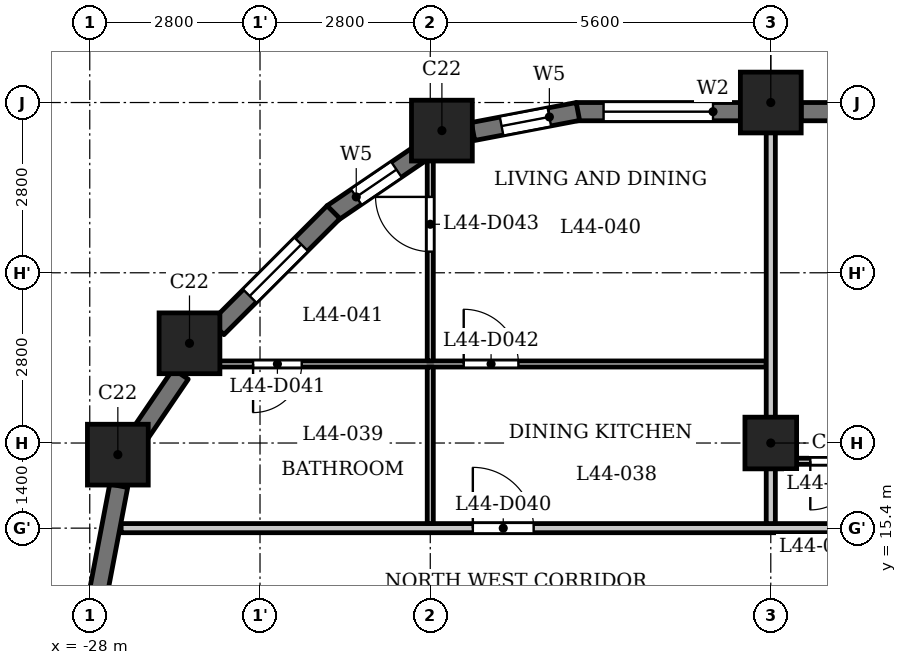
"""IFC4 building model, lengths in metres.
Left out: names, types, materials, properties, quantities, classifications, styles, units other than length and angle.
Written with IfcOpenShell. Run it as: python <this file> out.ifc"""

import sys

from ifc_helpers import new_model, si_unit, direction, frame, frame_2d, origin, origin_2d, place, context, subcontext, project, spatial, rectangle, extrude, element, fill, save


model = new_model("IFC4")
c1 = context("Model", 3, precision=1e-05, world=origin(), true_north=direction((0.0, 1.0)))
c2 = subcontext(c1, "Body", "Model", "MODEL_VIEW")
j1 = project(units=[si_unit("LENGTHUNIT", "METRE"), si_unit("PLANEANGLEUNIT", "RADIAN")], contexts=[c1])
p1 = place(None, origin())
s1 = spatial("IfcSite", under=j1, at=p1, CompositionType="ELEMENT")
p2 = place(p1, origin())
s2 = spatial("IfcBuilding", under=s1, at=p2, CompositionType="ELEMENT")
p3 = place(p2, frame((0.0, 0.0, 171.1)))
s3 = spatial("IfcBuildingStorey", under=s2, at=p3, CompositionType="ELEMENT", Elevation=171.1)
for number, where, z_axis, x_axis in (
    (1, (-16.8, 22.4, 0.0), (0.0, 0.0, 1.0), (1.0, 0.0, 0.0)),
    (2, (-22.209, 21.938, 0.0), (0.0, 0.0, 1.0), (1.0, 0.0, 0.0)),
    (3, (-26.36, 18.44, 0.0), (0.0, 0.0, 1.0), (1.0, 0.0, 0.0)),
    (4, (-27.538, 16.609, 0.0), (0.0, 0.0, 1.0), (1.0, 0.0, 0.0)),
):
    element("IfcColumn", number, at=place(p3, frame(where, z_axis=z_axis, x_axis=x_axis)), inside=s3, PredefinedType="COLUMN", context=c2, shape_type="SweptSolid", body=[
        extrude(rectangle(XDim=1.0, YDim=1.0, at=origin_2d()), origin(), (0.0, 0.0, 1.0), 3.5),
    ])
p4 = place(p3, frame((-16.8, 16.8, 0.0), z_axis=(0.0, 0.0, 1.0), x_axis=(1.0, 0.0, 0.0)))
e5 = element("IfcColumn", 5, at=p4, inside=s3, PredefinedType="COLUMN", context=c2, shape_type="SweptSolid", body=[
    extrude(rectangle(XDim=0.85, YDim=0.85, at=origin_2d()), origin(), (0.0, 0.0, 1.0), 3.5),
])
p5 = place(p3, frame((-11.7, 22.25, 0.0), z_axis=(0.0, 0.0, 1.0), x_axis=(-1.0, 0.0, 0.0)))
e6 = element("IfcWall", 6, at=p5, inside=s3, PredefinedType="SOLIDWALL", context=c2, shape_type="SweptSolid", body=[
    extrude(rectangle(XDim=4.6, YDim=0.3, at=frame_2d((2.3, 0.0))), origin(), (0.0, 0.0, 1.0), 2.45),
])
p6 = place(p5, frame((0.5, 0.0, 1.2)))
e7 = element("IfcOpeningElement", 7, at=p6, cuts=e6, PredefinedType="OPENING", context=c2, shape_type="SweptSolid", body=[
    extrude(rectangle(XDim=3.6, YDim=0.95, at=frame_2d((1.8, 0.475))), frame((0.0, 0.16, 0.0), z_axis=(0.0, -1.0, 0.0), x_axis=(1.0, 0.0, 0.0)), (0.0, 0.0, 1.0), 0.32),
])
p7 = place(p3, frame((-17.3, 22.25, 0.0), z_axis=(0.0, 0.0, 1.0), x_axis=(-1.0, 0.0, 0.0)))
e8 = element("IfcWall", 8, at=p7, inside=s3, PredefinedType="SOLIDWALL", context=c2, shape_type="SweptSolid", body=[
    extrude(rectangle(XDim=2.7, YDim=0.3, at=frame_2d((1.35, 0.0))), origin(), (0.0, 0.0, 1.0), 2.45),
])
p8 = place(p7, frame((0.45, 0.0, 0.9)))
e9 = element("IfcOpeningElement", 9, at=p8, cuts=e8, PredefinedType="OPENING", context=c2, shape_type="SweptSolid", body=[
    extrude(rectangle(XDim=1.8, YDim=1.25, at=frame_2d((0.9, 0.625))), frame((0.0, 0.16, 0.0), z_axis=(0.0, -1.0, 0.0), x_axis=(1.0, 0.0, 0.0)), (0.0, 0.0, 1.0), 0.32),
])
p9 = place(p3, frame((-19.972, 22.253, 0.0), z_axis=(0.0, 0.0, 1.0), x_axis=(-0.982284988433, -0.187393173565, 0.0)))
e10 = element("IfcWall", 10, at=p9, inside=s3, PredefinedType="SOLIDWALL", context=c2, shape_type="SweptSolid", body=[
    extrude(rectangle(XDim=1.756, YDim=0.3, at=frame_2d((0.878, 0.0))), origin(), (0.0, 0.0, 1.0), 2.45),
])
p10 = place(p9, frame((0.478, 0.0, 0.6)))
e11 = element("IfcOpeningElement", 11, at=p10, cuts=e10, PredefinedType="OPENING", context=c2, shape_type="SweptSolid", body=[
    extrude(rectangle(XDim=0.8, YDim=1.55, at=frame_2d((0.4, 0.775))), frame((0.0, 0.16, 0.0), z_axis=(0.0, -1.0, 0.0), x_axis=(1.0, 0.0, 0.0)), (0.0, 0.0, 1.0), 0.32),
])
p11 = place(p3, frame((-22.56, 21.566, 0.0), z_axis=(0.0, 0.0, 1.0), x_axis=(-0.82707645233, -0.562089443061, 0.0)))
e12 = element("IfcWall", 12, at=p11, inside=s3, PredefinedType="SOLIDWALL", context=c2, shape_type="SweptSolid", body=[
    extrude(rectangle(XDim=1.756, YDim=0.3, at=frame_2d((0.878, 0.0))), origin(), (0.0, 0.0, 1.0), 2.45),
])
p12 = place(p11, frame((0.478, 0.0, 0.6)))
e13 = element("IfcOpeningElement", 13, at=p12, cuts=e12, PredefinedType="OPENING", context=c2, shape_type="SweptSolid", body=[
    extrude(rectangle(XDim=0.8, YDim=1.55, at=frame_2d((0.4, 0.775))), frame((0.0, 0.16, 0.0), z_axis=(0.0, -1.0, 0.0), x_axis=(1.0, 0.0, 0.0)), (0.0, 0.0, 1.0), 0.32),
])
p13 = place(p3, frame((-23.991, 20.597, 0.0), z_axis=(0.0, 0.0, 1.0), x_axis=(-0.707106781187, -0.707106781187, 0.0)))
e14 = element("IfcWall", 14, at=p13, inside=s3, PredefinedType="SOLIDWALL", context=c2, shape_type="SweptSolid", body=[
    extrude(rectangle(XDim=2.7, YDim=0.3, at=frame_2d((1.35, 0.0))), origin(), (0.0, 0.0, 1.0), 2.45),
])
p14 = place(p13, frame((0.75, 0.0, 0.6)))
e15 = element("IfcOpeningElement", 15, at=p14, cuts=e14, PredefinedType="OPENING", context=c2, shape_type="SweptSolid", body=[
    extrude(rectangle(XDim=1.2, YDim=1.55, at=frame_2d((0.6, 0.775))), frame((0.0, 0.16, 0.0), z_axis=(0.0, -1.0, 0.0), x_axis=(1.0, 0.0, 0.0)), (0.0, 0.0, 1.0), 0.32),
])
p15 = place(p3, frame((-26.504, 17.934, 0.0), z_axis=(0.0, 0.0, 1.0), x_axis=(-0.562145470373, -0.827038372833, 0.0)))
e16 = element("IfcWall", 16, at=p15, inside=s3, PredefinedType="SOLIDWALL", context=c2, shape_type="SweptSolid", body=[
    extrude(rectangle(XDim=1.177, YDim=0.3, at=frame_2d((0.588, 0.0))), origin(), (0.0, 0.0, 1.0), 3.2),
])
p16 = place(p3, frame((-27.524, 16.097, 0.0), z_axis=(0.0, 0.0, 1.0), x_axis=(-0.187259034321, -0.982310569049, 0.0)))
e17 = element("IfcWall", 17, at=p16, inside=s3, PredefinedType="SOLIDWALL", context=c2, shape_type="SweptSolid", body=[
    extrude(rectangle(XDim=1.756, YDim=0.3, at=frame_2d((0.878, 0.0))), origin(), (0.0, 0.0, 1.0), 2.45),
])
p17 = place(p3, frame((-27.484, 15.4, 0.0), z_axis=(0.0, 0.0, 1.0), x_axis=(1.0, 0.0, 0.0)))
e18 = element("IfcWall", 18, at=p17, inside=s3, PredefinedType="PARTITIONING", context=c2, shape_type="SweptSolid", body=[
    extrude(rectangle(XDim=12.559, YDim=0.15, at=frame_2d((6.279, 0.0))), origin(), (0.0, 0.0, 1.0), 3.2),
])
p18 = place(p17, frame((5.784, 0.0, 0.0)))
e19 = element("IfcOpeningElement", 19, at=p18, cuts=e18, PredefinedType="OPENING", context=c2, shape_type="SweptSolid", body=[
    extrude(rectangle(XDim=1.0, YDim=2.1, at=frame_2d((0.5, 1.05))), frame((0.0, 0.085, 0.0), z_axis=(0.0, -1.0, 0.0), x_axis=(1.0, 0.0, 0.0)), (0.0, 0.0, 1.0), 0.17),
])
p19 = place(p3, frame((-16.725, 16.5, 0.0), z_axis=(0.0, 0.0, 1.0), x_axis=(1.0, 0.0, 0.0)))
e20 = element("IfcWall", 20, at=p19, inside=s3, PredefinedType="PARTITIONING", context=c2, shape_type="SweptSolid", body=[
    extrude(rectangle(XDim=33.45, YDim=0.1, at=frame_2d((16.725, 0.0))), origin(), (0.0, 0.0, 1.0), 3.2),
])
p20 = place(p19, frame((0.575, 0.0, 0.0)))
e21 = element("IfcOpeningElement", 21, at=p20, cuts=e20, PredefinedType="OPENING", context=c2, shape_type="SweptSolid", body=[
    extrude(rectangle(XDim=0.8, YDim=2.1, at=frame_2d((0.4, 1.05))), frame((0.0, 0.06, 0.0), z_axis=(0.0, -1.0, 0.0), x_axis=(1.0, 0.0, 0.0)), (0.0, 0.0, 1.0), 0.12),
])
p21 = place(p19, frame((3.225, 0.0, 0.0)))
e22 = element("IfcOpeningElement", 22, at=p21, cuts=e20, PredefinedType="OPENING", context=c2, shape_type="SweptSolid", body=[
    extrude(rectangle(XDim=0.9, YDim=2.1, at=frame_2d((0.45, 1.05))), frame((0.0, 0.06, 0.0), z_axis=(0.0, -1.0, 0.0), x_axis=(1.0, 0.0, 0.0)), (0.0, 0.0, 1.0), 0.12),
])
p22 = place(p19, frame((6.775, 0.0, 0.0)))
e23 = element("IfcOpeningElement", 23, at=p22, cuts=e20, PredefinedType="OPENING", context=c2, shape_type="SweptSolid", body=[
    extrude(rectangle(XDim=0.9, YDim=2.1, at=frame_2d((0.45, 1.05))), frame((0.0, 0.06, 0.0), z_axis=(0.0, -1.0, 0.0), x_axis=(1.0, 0.0, 0.0)), (0.0, 0.0, 1.0), 0.12),
])
p23 = place(p19, frame((8.825, 0.0, 0.0)))
e24 = element("IfcOpeningElement", 24, at=p23, cuts=e20, PredefinedType="OPENING", context=c2, shape_type="SweptSolid", body=[
    extrude(rectangle(XDim=0.9, YDim=2.1, at=frame_2d((0.45, 1.05))), frame((0.0, 0.06, 0.0), z_axis=(0.0, -1.0, 0.0), x_axis=(1.0, 0.0, 0.0)), (0.0, 0.0, 1.0), 0.12),
])
p24 = place(p19, frame((20.775, 0.0, 0.0)))
e25 = element("IfcOpeningElement", 25, at=p24, cuts=e20, PredefinedType="OPENING", context=c2, shape_type="SweptSolid", body=[
    extrude(rectangle(XDim=0.8, YDim=2.1, at=frame_2d((0.4, 1.05))), frame((0.0, 0.06, 0.0), z_axis=(0.0, -1.0, 0.0), x_axis=(1.0, 0.0, 0.0)), (0.0, 0.0, 1.0), 0.12),
])
p25 = place(p19, frame((17.325, 0.0, 0.0)))
e26 = element("IfcOpeningElement", 26, at=p25, cuts=e20, PredefinedType="OPENING", context=c2, shape_type="SweptSolid", body=[
    extrude(rectangle(XDim=0.9, YDim=2.1, at=frame_2d((0.45, 1.05))), frame((0.0, 0.06, 0.0), z_axis=(0.0, -1.0, 0.0), x_axis=(1.0, 0.0, 0.0)), (0.0, 0.0, 1.0), 0.12),
])
p26 = place(p19, frame((12.375, 0.0, 0.0)))
e27 = element("IfcOpeningElement", 27, at=p26, cuts=e20, PredefinedType="OPENING", context=c2, shape_type="SweptSolid", body=[
    extrude(rectangle(XDim=0.9, YDim=2.1, at=frame_2d((0.45, 1.05))), frame((0.0, 0.06, 0.0), z_axis=(0.0, -1.0, 0.0), x_axis=(1.0, 0.0, 0.0)), (0.0, 0.0, 1.0), 0.12),
])
p27 = place(p19, frame((14.425, 0.0, 0.0)))
e28 = element("IfcOpeningElement", 28, at=p27, cuts=e20, PredefinedType="OPENING", context=c2, shape_type="SweptSolid", body=[
    extrude(rectangle(XDim=0.9, YDim=2.1, at=frame_2d((0.45, 1.05))), frame((0.0, 0.06, 0.0), z_axis=(0.0, -1.0, 0.0), x_axis=(1.0, 0.0, 0.0)), (0.0, 0.0, 1.0), 0.12),
])
p28 = place(p19, frame((26.575, 0.0, 0.0)))
e29 = element("IfcOpeningElement", 29, at=p28, cuts=e20, PredefinedType="OPENING", context=c2, shape_type="SweptSolid", body=[
    extrude(rectangle(XDim=0.8, YDim=2.1, at=frame_2d((0.4, 1.05))), frame((0.0, 0.06, 0.0), z_axis=(0.0, -1.0, 0.0), x_axis=(1.0, 0.0, 0.0)), (0.0, 0.0, 1.0), 0.12),
])
p29 = place(p19, frame((23.775, 0.0, 0.0)))
e30 = element("IfcOpeningElement", 30, at=p29, cuts=e20, PredefinedType="OPENING", context=c2, shape_type="SweptSolid", body=[
    extrude(rectangle(XDim=0.9, YDim=2.1, at=frame_2d((0.45, 1.05))), frame((0.0, 0.06, 0.0), z_axis=(0.0, -1.0, 0.0), x_axis=(1.0, 0.0, 0.0)), (0.0, 0.0, 1.0), 0.12),
])
p30 = place(p19, frame((32.075, 0.0, 0.0)))
e31 = element("IfcOpeningElement", 31, at=p30, cuts=e20, PredefinedType="OPENING", context=c2, shape_type="SweptSolid", body=[
    extrude(rectangle(XDim=0.8, YDim=2.1, at=frame_2d((0.4, 1.05))), frame((0.0, 0.06, 0.0), z_axis=(0.0, -1.0, 0.0), x_axis=(1.0, 0.0, 0.0)), (0.0, 0.0, 1.0), 0.12),
])
p31 = place(p19, frame((29.375, 0.0, 0.0)))
e32 = element("IfcOpeningElement", 32, at=p31, cuts=e20, PredefinedType="OPENING", context=c2, shape_type="SweptSolid", body=[
    extrude(rectangle(XDim=0.9, YDim=2.1, at=frame_2d((0.45, 1.05))), frame((0.0, 0.06, 0.0), z_axis=(0.0, -1.0, 0.0), x_axis=(1.0, 0.0, 0.0)), (0.0, 0.0, 1.0), 0.12),
])
p32 = place(p3, frame((-26.44, 18.1, 0.0), z_axis=(0.0, 0.0, 1.0), x_axis=(1.0, 0.0, 0.0)))
e33 = element("IfcWall", 33, at=p32, inside=s3, PredefinedType="PARTITIONING", context=c2, shape_type="SweptSolid", body=[
    extrude(rectangle(XDim=9.565, YDim=0.1, at=frame_2d((4.782, 0.0))), origin(), (0.0, 0.0, 1.0), 3.2),
])
p33 = place(p32, frame((1.126, 0.0, 0.0)))
e34 = element("IfcOpeningElement", 34, at=p33, cuts=e33, PredefinedType="OPENING", context=c2, shape_type="SweptSolid", body=[
    extrude(rectangle(XDim=0.8, YDim=2.1, at=frame_2d((0.4, 1.05))), frame((0.0, 0.06, 0.0), z_axis=(0.0, -1.0, 0.0), x_axis=(1.0, 0.0, 0.0)), (0.0, 0.0, 1.0), 0.12),
])
p34 = place(p32, frame((4.59, 0.0, 0.0)))
e35 = element("IfcOpeningElement", 35, at=p34, cuts=e33, PredefinedType="OPENING", context=c2, shape_type="SweptSolid", body=[
    extrude(rectangle(XDim=0.9, YDim=2.1, at=frame_2d((0.45, 1.05))), frame((0.0, 0.06, 0.0), z_axis=(0.0, -1.0, 0.0), x_axis=(1.0, 0.0, 0.0)), (0.0, 0.0, 1.0), 0.12),
])
p35 = place(p3, frame((-22.4, 15.475, 0.0), z_axis=(0.0, 0.0, 1.0), x_axis=(0.0, 1.0, 0.0)))
e36 = element("IfcWall", 36, at=p35, inside=s3, PredefinedType="PARTITIONING", context=c2, shape_type="SweptSolid", body=[
    extrude(rectangle(XDim=2.575, YDim=0.1, at=frame_2d((1.288, 0.0))), origin(), (0.0, 0.0, 1.0), 3.2),
])
p36 = place(p3, frame((-22.4, 18.15, 0.0), z_axis=(0.0, 0.0, 1.0), x_axis=(0.0, 1.0, 0.0)))
e37 = element("IfcWall", 37, at=p36, inside=s3, PredefinedType="PARTITIONING", context=c2, shape_type="SweptSolid", body=[
    extrude(rectangle(XDim=3.57, YDim=0.1, at=frame_2d((1.785, 0.0))), origin(), (0.0, 0.0, 1.0), 3.2),
])
p37 = place(p36, frame((1.798, 0.0, 0.0)))
e38 = element("IfcOpeningElement", 38, at=p37, cuts=e37, PredefinedType="OPENING", context=c2, shape_type="SweptSolid", body=[
    extrude(rectangle(XDim=0.9, YDim=2.1, at=frame_2d((0.45, 1.05))), frame((0.0, 0.06, 0.0), z_axis=(0.0, -1.0, 0.0), x_axis=(1.0, 0.0, 0.0)), (0.0, 0.0, 1.0), 0.12),
])
p38 = place(p3, frame((-16.8, 15.475, 0.0), z_axis=(0.0, 0.0, 1.0), x_axis=(0.0, 1.0, 0.0)))
e39 = element("IfcWall", 39, at=p38, inside=s3, PredefinedType="PARTITIONING", context=c2, shape_type="SweptSolid", body=[
    extrude(rectangle(XDim=7.405, YDim=0.15, at=frame_2d((3.702, 0.0))), origin(), (0.0, 0.0, 1.0), 3.2),
])
p39 = place(p20, origin())
e40 = element("IfcDoor", 40, at=p39, inside=s3, OperationType="SINGLE_SWING_LEFT", PredefinedType="DOOR", context=c2, shape_type="SweptSolid", body=[
    extrude(rectangle(XDim=0.8, YDim=2.1, at=frame_2d((0.4, 1.05))), frame((0.0, 0.025, 0.0), z_axis=(0.0, -1.0, 0.0), x_axis=(1.0, 0.0, 0.0)), (0.0, 0.0, 1.0), 0.05),
])
fill(e21, e40)
p40 = place(p18, origin())
e41 = element("IfcDoor", 41, at=p40, inside=s3, OperationType="SINGLE_SWING_RIGHT", PredefinedType="DOOR", context=c2, shape_type="SweptSolid", body=[
    extrude(rectangle(XDim=1.0, YDim=2.1, at=frame_2d((0.5, 1.05))), frame((0.0, 0.025, 0.0), z_axis=(0.0, -1.0, 0.0), x_axis=(1.0, 0.0, 0.0)), (0.0, 0.0, 1.0), 0.05),
])
fill(e19, e41)
p41 = place(p33, origin())
e42 = element("IfcDoor", 42, at=p41, inside=s3, OperationType="SINGLE_SWING_LEFT", PredefinedType="DOOR", context=c2, shape_type="SweptSolid", body=[
    extrude(rectangle(XDim=0.8, YDim=2.1, at=frame_2d((0.4, 1.05))), frame((0.0, 0.025, 0.0), z_axis=(0.0, -1.0, 0.0), x_axis=(1.0, 0.0, 0.0)), (0.0, 0.0, 1.0), 0.05),
])
fill(e34, e42)
p42 = place(p34, origin())
e43 = element("IfcDoor", 43, at=p42, inside=s3, OperationType="SINGLE_SWING_RIGHT", PredefinedType="DOOR", context=c2, shape_type="SweptSolid", body=[
    extrude(rectangle(XDim=0.9, YDim=2.1, at=frame_2d((0.45, 1.05))), frame((0.0, 0.025, 0.0), z_axis=(0.0, -1.0, 0.0), x_axis=(1.0, 0.0, 0.0)), (0.0, 0.0, 1.0), 0.05),
])
fill(e35, e43)
p43 = place(p37, origin())
e44 = element("IfcDoor", 44, at=p43, inside=s3, OperationType="SINGLE_SWING_LEFT", PredefinedType="DOOR", context=c2, shape_type="SweptSolid", body=[
    extrude(rectangle(XDim=0.9, YDim=2.1, at=frame_2d((0.45, 1.05))), frame((0.0, 0.025, 0.0), z_axis=(0.0, -1.0, 0.0), x_axis=(1.0, 0.0, 0.0)), (0.0, 0.0, 1.0), 0.05),
])
fill(e38, e44)
p44 = place(p8, origin())
e45 = element("IfcWindow", 45, at=p44, inside=s3, PartitioningType="SINGLE_PANEL", PredefinedType="WINDOW", context=c2, shape_type="SweptSolid", body=[
    extrude(rectangle(XDim=1.8, YDim=1.25, at=frame_2d((0.9, 0.625))), frame((0.0, 0.03, 0.0), z_axis=(0.0, -1.0, 0.0), x_axis=(1.0, 0.0, 0.0)), (0.0, 0.0, 1.0), 0.06),
])
fill(e9, e45)
p45 = place(p10, origin())
e46 = element("IfcWindow", 46, at=p45, inside=s3, PartitioningType="SINGLE_PANEL", PredefinedType="WINDOW", context=c2, shape_type="SweptSolid", body=[
    extrude(rectangle(XDim=0.8, YDim=1.55, at=frame_2d((0.4, 0.775))), frame((0.0, 0.03, 0.0), z_axis=(0.0, -1.0, 0.0), x_axis=(1.0, 0.0, 0.0)), (0.0, 0.0, 1.0), 0.06),
])
fill(e11, e46)
p46 = place(p12, origin())
e47 = element("IfcWindow", 47, at=p46, inside=s3, PartitioningType="SINGLE_PANEL", PredefinedType="WINDOW", context=c2, shape_type="SweptSolid", body=[
    extrude(rectangle(XDim=0.8, YDim=1.55, at=frame_2d((0.4, 0.775))), frame((0.0, 0.03, 0.0), z_axis=(0.0, -1.0, 0.0), x_axis=(1.0, 0.0, 0.0)), (0.0, 0.0, 1.0), 0.06),
])
fill(e13, e47)
p47 = place(p14, origin())
e48 = element("IfcWindow", 48, at=p47, inside=s3, PartitioningType="SINGLE_PANEL", PredefinedType="WINDOW", context=c2, shape_type="SweptSolid", body=[
    extrude(rectangle(XDim=1.2, YDim=1.55, at=frame_2d((0.6, 0.775))), frame((0.0, 0.03, 0.0), z_axis=(0.0, -1.0, 0.0), x_axis=(1.0, 0.0, 0.0)), (0.0, 0.0, 1.0), 0.06),
])
fill(e15, e48)
save(model, sys.argv[1])
